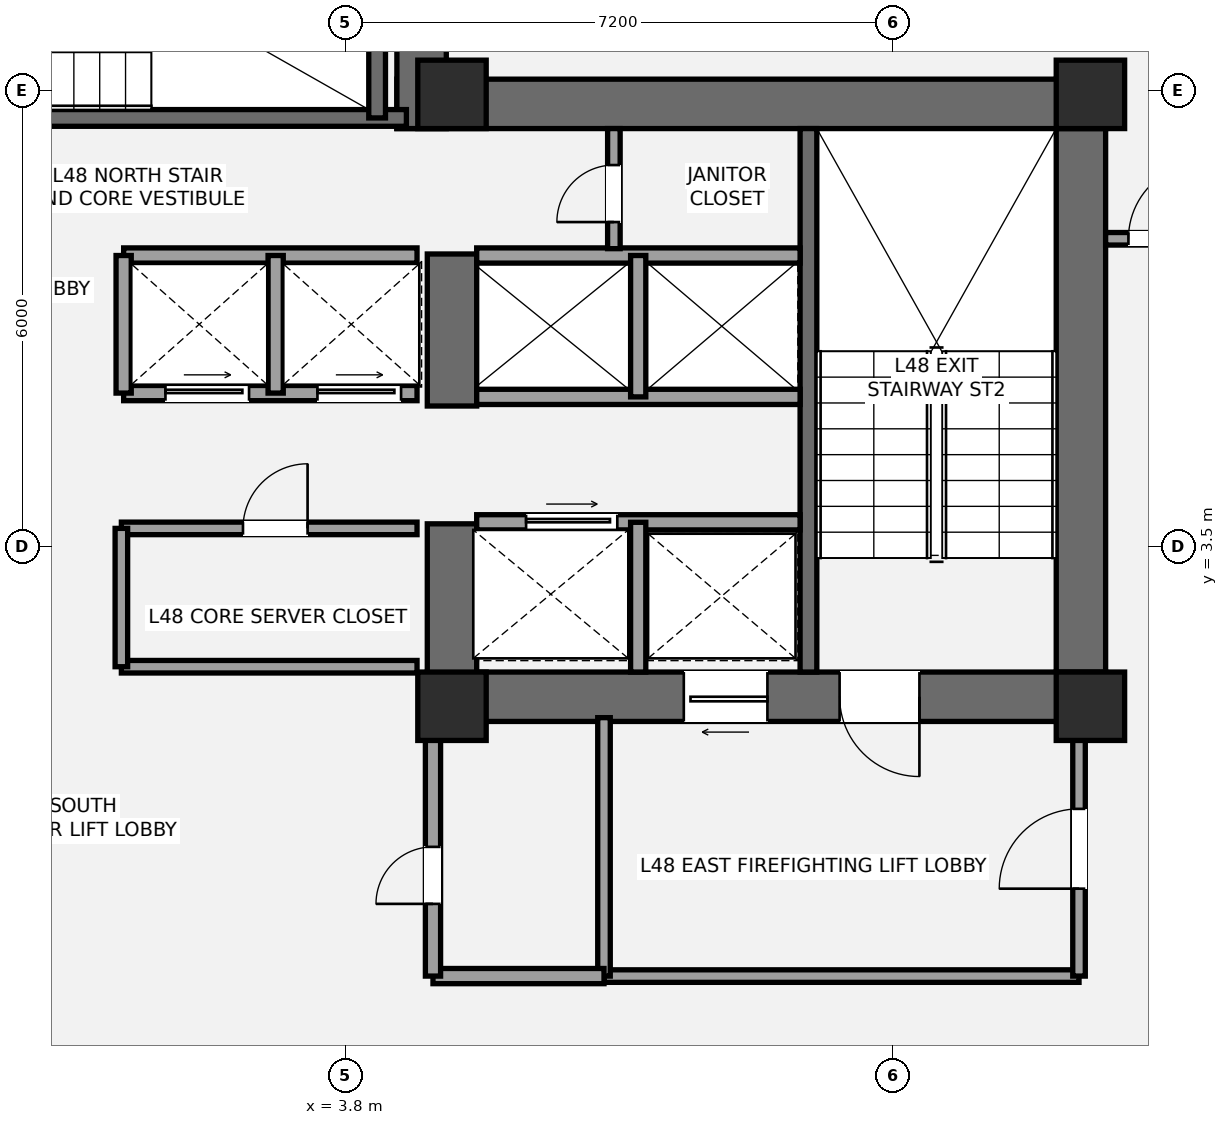
"""IFC4 building model, lengths in metres.
Left out: names, types, materials, properties, quantities, classifications, styles, units other than length and angle.
Written with IfcOpenShell. Run it as: python <this file> out.ifc"""

import sys

from ifc_helpers import new_model, si_unit, direction, frame, frame_2d, origin, origin_2d, place, context, subcontext, project, spatial, rectangle, extrude, element, fill, save


model = new_model("IFC4")
c1 = context("Model", 3, precision=1e-05, world=origin(), true_north=direction((0.0, 1.0)))
c2 = subcontext(c1, "Body", "Model", "MODEL_VIEW")
j1 = project(units=[si_unit("LENGTHUNIT", "METRE"), si_unit("PLANEANGLEUNIT", "RADIAN")], contexts=[c1])
p1 = place(None, origin())
s1 = spatial("IfcSite", under=j1, at=p1, CompositionType="ELEMENT")
p2 = place(p1, origin())
s2 = spatial("IfcBuilding", under=s1, at=p2, CompositionType="ELEMENT")
p3 = place(p2, frame((0.0, 0.0, 175.8)))
s3 = spatial("IfcBuildingStorey", under=s2, at=p3, CompositionType="ELEMENT", Elevation=175.8)
p4 = place(p3, frame((13.475, 1.2, 0.0), z_axis=(0.0, 0.0, 1.0), x_axis=(0.0, 1.0, 0.0)))
e1 = element("IfcWall", 1, at=p4, inside=s3, PredefinedType="SHEAR", context=c2, shape_type="SweptSolid", body=[
    extrude(rectangle(XDim=8.45, YDim=0.65, at=frame_2d((4.225, 0.0))), origin(), (0.0, 0.0, 1.0), 3.2),
])
p5 = place(p3, frame((4.475, 9.325, 0.0), z_axis=(0.0, 0.0, 1.0), x_axis=(1.0, 0.0, 0.0)))
e2 = element("IfcWall", 2, at=p5, inside=s3, PredefinedType="SHEAR", context=c2, shape_type="SweptSolid", body=[
    extrude(rectangle(XDim=9.325, YDim=0.65, at=frame_2d((4.663, 0.0))), origin(), (0.0, 0.0, 1.0), 3.2),
])
p6 = place(p3, frame((13.8, 1.525, 0.0), z_axis=(0.0, 0.0, 1.0), x_axis=(-1.0, 0.0, 0.0)))
e3 = element("IfcWall", 3, at=p6, inside=s3, PredefinedType="SHEAR", context=c2, shape_type="SweptSolid", body=[
    extrude(rectangle(XDim=8.925, YDim=0.65, at=frame_2d((4.462, 0.0))), origin(), (0.0, 0.0, 1.0), 3.2),
])
p7 = place(p6, frame((2.45, 0.0, 0.0)))
e4 = element("IfcOpeningElement", 4, at=p7, cuts=e3, PredefinedType="OPENING", context=c2, shape_type="SweptSolid", body=[
    extrude(rectangle(XDim=1.05, YDim=2.15, at=frame_2d((0.525, 1.075))), frame((0.0, 0.335, 0.0), z_axis=(0.0, -1.0, 0.0), x_axis=(1.0, 0.0, 0.0)), (0.0, 0.0, 1.0), 0.67),
])
p8 = place(p6, frame((4.45, 0.0, 0.0)))
e5 = element("IfcOpeningElement", 5, at=p8, cuts=e3, PredefinedType="OPENING", context=c2, shape_type="SweptSolid", body=[
    extrude(rectangle(XDim=1.1, YDim=2.2, at=frame_2d((0.55, 1.1))), frame((0.0, 0.335, 0.0), z_axis=(0.0, -1.0, 0.0), x_axis=(1.0, 0.0, 0.0)), (0.0, 0.0, 1.0), 0.67),
])
p9 = place(p3, frame((5.2, 1.2, 0.0), z_axis=(0.0, 0.0, 1.0), x_axis=(0.0, 1.0, 0.0)))
e6 = element("IfcWall", 6, at=p9, inside=s3, PredefinedType="SHEAR", context=c2, shape_type="SweptSolid", body=[
    extrude(rectangle(XDim=2.6, YDim=0.65, at=frame_2d((1.3, 0.0))), origin(), (0.0, 0.0, 1.0), 3.2),
])
p10 = place(p3, frame((5.2, 5.35, 0.0), z_axis=(0.0, 0.0, 1.0), x_axis=(0.0, 1.0, 0.0)))
e7 = element("IfcWall", 7, at=p10, inside=s3, PredefinedType="SHEAR", context=c2, shape_type="SweptSolid", body=[
    extrude(rectangle(XDim=2.0, YDim=0.65, at=frame_2d((1.0, 0.0))), origin(), (0.0, 0.0, 1.0), 3.2),
])
p11 = place(p3, frame((9.89, 1.85, 0.0), z_axis=(0.0, 0.0, 1.0), x_axis=(0.0, 1.0, 0.0)))
e8 = element("IfcWall", 8, at=p11, inside=s3, PredefinedType="SHEAR", context=c2, shape_type="SweptSolid", body=[
    extrude(rectangle(XDim=7.15, YDim=0.22, at=frame_2d((3.575, 0.0))), origin(), (0.0, 0.0, 1.0), 3.2),
])
p12 = place(p3, frame((4.8, 9.0, 0.0), z_axis=(0.0, 0.0, 1.0), x_axis=(0.0, 1.0, 0.0)))
e9 = element("IfcWall", 9, at=p12, inside=s3, PredefinedType="SHEAR", context=c2, shape_type="SweptSolid", body=[
    extrude(rectangle(XDim=4.05, YDim=0.65, at=frame_2d((2.025, 0.0))), origin(), (0.0, 0.0, 1.0), 3.2),
])
p13 = place(p3, frame((-4.7, 9.14, 0.0), z_axis=(0.0, 0.0, 1.0), x_axis=(1.0, 0.0, 0.0)))
e10 = element("IfcWall", 10, at=p13, inside=s3, PredefinedType="SHEAR", context=c2, shape_type="SweptSolid", body=[
    extrude(rectangle(XDim=9.3, YDim=0.22, at=frame_2d((4.65, 0.0))), origin(), (0.0, 0.0, 1.0), 3.2),
])
p14 = place(p13, frame((1.15, 0.0, 0.0)))
e11 = element("IfcOpeningElement", 11, at=p14, cuts=e10, PredefinedType="OPENING", context=c2, shape_type="SweptSolid", body=[
    extrude(rectangle(XDim=1.05, YDim=2.15, at=frame_2d((0.525, 1.075))), frame((0.0, 0.12, 0.0), z_axis=(0.0, -1.0, 0.0), x_axis=(1.0, 0.0, 0.0)), (0.0, 0.0, 1.0), 0.24),
])
p15 = place(p3, frame((4.215, 9.14, 0.0), z_axis=(0.0, 0.0, 1.0), x_axis=(0.0, 1.0, 0.0)))
e12 = element("IfcWall", 12, at=p15, inside=s3, PredefinedType="SHEAR", context=c2, shape_type="SweptSolid", body=[
    extrude(rectangle(XDim=3.26, YDim=0.22, at=frame_2d((1.63, 0.0))), origin(), (0.0, 0.0, 1.0), 3.2),
])
for number, where, z_axis, x_axis in (
    (13, (5.2, 1.4, 0.0), (0.0, 0.0, 1.0), (1.0, 0.0, 0.0)),
    (14, (5.2, 9.45, 0.0), (0.0, 0.0, 1.0), (1.0, 0.0, 0.0)),
    (15, (13.6, 1.4, 0.0), (0.0, 0.0, 1.0), (1.0, 0.0, 0.0)),
    (16, (13.6, 9.45, 0.0), (0.0, 0.0, 1.0), (1.0, 0.0, 0.0)),
):
    element("IfcColumn", number, at=place(p3, frame(where, z_axis=z_axis, x_axis=x_axis)), inside=s3, PredefinedType="COLUMN", context=c2, shape_type="SweptSolid", body=[
        extrude(rectangle(XDim=0.9, YDim=0.9, at=origin_2d()), origin(), (0.0, 0.0, 1.0), 3.2),
    ])
p16 = place(p3, frame((7.2, -2.15, 0.0), z_axis=(0.0, 0.0, 1.0), x_axis=(1.0, 0.0, 0.0)))
e17 = element("IfcWall", 17, at=p16, inside=s3, PredefinedType="PARTITIONING", context=c2, shape_type="SweptSolid", body=[
    extrude(rectangle(XDim=6.25, YDim=0.165, at=frame_2d((3.125, 0.0))), origin(), (0.0, 0.0, 1.0), 3.02),
])
p17 = place(p3, frame((7.2, -2.15, 0.0), z_axis=(0.0, 0.0, 1.0), x_axis=(0.0, 1.0, 0.0)))
e18 = element("IfcWall", 18, at=p17, inside=s3, PredefinedType="PARTITIONING", context=c2, shape_type="SweptSolid", body=[
    extrude(rectangle(XDim=3.4, YDim=0.165, at=frame_2d((1.7, 0.0))), origin(), (0.0, 0.0, 1.0), 2.473),
])
p18 = place(p3, frame((13.45, -2.15, 0.0), z_axis=(0.0, 0.0, 1.0), x_axis=(0.0, 1.0, 0.0)))
e19 = element("IfcWall", 19, at=p18, inside=s3, PredefinedType="PARTITIONING", context=c2, shape_type="SweptSolid", body=[
    extrude(rectangle(XDim=3.4, YDim=0.165, at=frame_2d((1.7, 0.0))), origin(), (0.0, 0.0, 1.0), 2.473),
])
p19 = place(p18, frame((1.15, 0.0, 0.0)))
e20 = element("IfcOpeningElement", 20, at=p19, cuts=e19, PredefinedType="OPENING", context=c2, shape_type="SweptSolid", body=[
    extrude(rectangle(XDim=1.05, YDim=2.15, at=frame_2d((0.525, 1.075))), frame((0.0, 0.093, 0.0), z_axis=(0.0, -1.0, 0.0), x_axis=(1.0, 0.0, 0.0)), (0.0, 0.0, 1.0), 0.185),
])
p20 = place(p3, frame((4.95, -2.15, 0.0), z_axis=(0.0, 0.0, 1.0), x_axis=(1.0, 0.0, 0.0)))
e21 = element("IfcWall", 21, at=p20, inside=s3, PredefinedType="SOLIDWALL", context=c2, shape_type="SweptSolid", body=[
    extrude(rectangle(XDim=2.25, YDim=0.2, at=frame_2d((1.125, 0.0))), origin(), (0.0, 0.0, 1.0), 3.02),
])
p21 = place(p3, frame((4.95, -2.15, 0.0), z_axis=(0.0, 0.0, 1.0), x_axis=(0.0, 1.0, 0.0)))
e22 = element("IfcWall", 22, at=p21, inside=s3, PredefinedType="SOLIDWALL", context=c2, shape_type="SweptSolid", body=[
    extrude(rectangle(XDim=3.4, YDim=0.2, at=frame_2d((1.7, 0.0))), origin(), (0.0, 0.0, 1.0), 2.473),
])
p22 = place(p21, frame((0.95, 0.0, 0.0)))
e23 = element("IfcOpeningElement", 23, at=p22, cuts=e22, PredefinedType="OPENING", context=c2, shape_type="SweptSolid", body=[
    extrude(rectangle(XDim=0.75, YDim=2.1, at=frame_2d((0.375, 1.05))), frame((0.0, 0.11, 0.0), z_axis=(0.0, -1.0, 0.0), x_axis=(1.0, 0.0, 0.0)), (0.0, 0.0, 1.0), 0.22),
])
p23 = place(p3, frame((5.525, 3.82, 0.0), z_axis=(0.0, 0.0, 1.0), x_axis=(1.0, 0.0, 0.0)))
e24 = element("IfcWall", 24, at=p23, inside=s3, PredefinedType="SOLIDWALL", context=c2, shape_type="SweptSolid", body=[
    extrude(rectangle(XDim=4.255, YDim=0.2, at=frame_2d((2.127, 0.0))), origin(), (0.0, 0.0, 1.0), 3.02),
])
p24 = place(p23, frame((0.65, 0.0, 0.0)))
e25 = element("IfcOpeningElement", 25, at=p24, cuts=e24, PredefinedType="OPENING", context=c2, shape_type="SweptSolid", body=[
    extrude(rectangle(XDim=1.2, YDim=2.2, at=frame_2d((0.6, 1.1))), frame((0.0, 0.11, 0.0), z_axis=(0.0, -1.0, 0.0), x_axis=(1.0, 0.0, 0.0)), (0.0, 0.0, 1.0), 0.22),
])
p25 = place(p3, frame((7.65, 1.85, 0.0), z_axis=(0.0, 0.0, 1.0), x_axis=(0.0, 1.0, 0.0)))
e26 = element("IfcWall", 26, at=p25, inside=s3, PredefinedType="SOLIDWALL", context=c2, shape_type="SweptSolid", body=[
    extrude(rectangle(XDim=1.97, YDim=0.2, at=frame_2d((0.985, 0.0))), origin(), (0.0, 0.0, 1.0), 3.02),
])
for number, where, z_axis, x_axis in (
    (27, (5.525, 5.47, 0.0), (0.0, 0.0, 1.0), (1.0, 0.0, 0.0)),
    (28, (5.525, 7.33, 0.0), (0.0, 0.0, 1.0), (1.0, 0.0, 0.0)),
):
    element("IfcWall", number, at=place(p3, frame(where, z_axis=z_axis, x_axis=x_axis)), inside=s3, PredefinedType="SOLIDWALL", context=c2, shape_type="SweptSolid", body=[
        extrude(rectangle(XDim=4.255, YDim=0.2, at=frame_2d((2.127, 0.0))), origin(), (0.0, 0.0, 1.0), 3.02),
    ])
p26 = place(p3, frame((7.65, 5.47, 0.0), z_axis=(0.0, 0.0, 1.0), x_axis=(0.0, 1.0, 0.0)))
e29 = element("IfcWall", 29, at=p26, inside=s3, PredefinedType="SOLIDWALL", context=c2, shape_type="SweptSolid", body=[
    extrude(rectangle(XDim=1.86, YDim=0.2, at=frame_2d((0.93, 0.0))), origin(), (0.0, 0.0, 1.0), 3.02),
])
p27 = place(p3, frame((0.85, 1.92, 0.0), z_axis=(0.0, 0.0, 1.0), x_axis=(1.0, 0.0, 0.0)))
e30 = element("IfcWall", 30, at=p27, inside=s3, PredefinedType="PARTITIONING", context=c2, shape_type="SweptSolid", body=[
    extrude(rectangle(XDim=3.89, YDim=0.165, at=frame_2d((1.945, 0.0))), origin(), (0.0, 0.0, 1.0), 2.16),
])
p28 = place(p3, frame((0.85, 3.74, 0.0), z_axis=(0.0, 0.0, 1.0), x_axis=(1.0, 0.0, 0.0)))
e31 = element("IfcWall", 31, at=p28, inside=s3, PredefinedType="PARTITIONING", context=c2, shape_type="SweptSolid", body=[
    extrude(rectangle(XDim=3.89, YDim=0.165, at=frame_2d((1.945, 0.0))), origin(), (0.0, 0.0, 1.0), 3.02),
])
p29 = place(p28, frame((1.6, 0.0, 0.0)))
e32 = element("IfcOpeningElement", 32, at=p29, cuts=e31, PredefinedType="OPENING", context=c2, shape_type="SweptSolid", body=[
    extrude(rectangle(XDim=0.85, YDim=2.1, at=frame_2d((0.425, 1.05))), frame((0.0, 0.093, 0.0), z_axis=(0.0, -1.0, 0.0), x_axis=(1.0, 0.0, 0.0)), (0.0, 0.0, 1.0), 0.185),
])
p30 = place(p3, frame((0.85, 1.92, 0.0), z_axis=(0.0, 0.0, 1.0), x_axis=(0.0, 1.0, 0.0)))
e33 = element("IfcWall", 33, at=p30, inside=s3, PredefinedType="PARTITIONING", context=c2, shape_type="SweptSolid", body=[
    extrude(rectangle(XDim=1.82, YDim=0.165, at=frame_2d((0.91, 0.0))), origin(), (0.0, 0.0, 1.0), 3.02),
])
p31 = place(p3, frame((0.88, 5.52, 0.0), z_axis=(0.0, 0.0, 1.0), x_axis=(1.0, 0.0, 0.0)))
e34 = element("IfcWall", 34, at=p31, inside=s3, PredefinedType="SOLIDWALL", context=c2, shape_type="SweptSolid", body=[
    extrude(rectangle(XDim=3.86, YDim=0.2, at=frame_2d((1.93, 0.0))), origin(), (0.0, 0.0, 1.0), 3.02),
])
p32 = place(p31, frame((0.55, 0.0, 0.0)))
e35 = element("IfcOpeningElement", 35, at=p32, cuts=e34, PredefinedType="OPENING", context=c2, shape_type="SweptSolid", body=[
    extrude(rectangle(XDim=1.1, YDim=2.2, at=frame_2d((0.55, 1.1))), frame((0.0, 0.11, 0.0), z_axis=(0.0, -1.0, 0.0), x_axis=(1.0, 0.0, 0.0)), (0.0, 0.0, 1.0), 0.22),
])
p33 = place(p31, frame((2.55, 0.0, 0.0)))
e36 = element("IfcOpeningElement", 36, at=p33, cuts=e34, PredefinedType="OPENING", context=c2, shape_type="SweptSolid", body=[
    extrude(rectangle(XDim=1.1, YDim=2.2, at=frame_2d((0.55, 1.1))), frame((0.0, 0.11, 0.0), z_axis=(0.0, -1.0, 0.0), x_axis=(1.0, 0.0, 0.0)), (0.0, 0.0, 1.0), 0.22),
])
p34 = place(p3, frame((0.88, 7.33, 0.0), z_axis=(0.0, 0.0, 1.0), x_axis=(1.0, 0.0, 0.0)))
e37 = element("IfcWall", 37, at=p34, inside=s3, PredefinedType="SOLIDWALL", context=c2, shape_type="SweptSolid", body=[
    extrude(rectangle(XDim=3.86, YDim=0.2, at=frame_2d((1.93, 0.0))), origin(), (0.0, 0.0, 1.0), 3.02),
])
for number, where, z_axis, x_axis in (
    (38, (2.88, 5.52, 0.0), (0.0, 0.0, 1.0), (0.0, 1.0, 0.0)),
    (39, (0.88, 5.52, 0.0), (0.0, 0.0, 1.0), (0.0, 1.0, 0.0)),
):
    element("IfcWall", number, at=place(p3, frame(where, z_axis=z_axis, x_axis=x_axis)), inside=s3, PredefinedType="SOLIDWALL", context=c2, shape_type="SweptSolid", body=[
        extrude(rectangle(XDim=1.81, YDim=0.2, at=frame_2d((0.905, 0.0))), origin(), (0.0, 0.0, 1.0), 3.02),
    ])
p35 = place(p3, frame((7.33, 7.42, 0.0), z_axis=(0.0, 0.0, 1.0), x_axis=(0.0, 1.0, 0.0)))
e40 = element("IfcWall", 40, at=p35, inside=s3, PredefinedType="PARTITIONING", context=c2, shape_type="SweptSolid", body=[
    extrude(rectangle(XDim=1.58, YDim=0.165, at=frame_2d((0.79, 0.0))), origin(), (0.0, 0.0, 1.0), 3.02),
])
p36 = place(p35, frame((0.35, 0.0, 0.0)))
e41 = element("IfcOpeningElement", 41, at=p36, cuts=e40, PredefinedType="OPENING", context=c2, shape_type="SweptSolid", body=[
    extrude(rectangle(XDim=0.75, YDim=2.1, at=frame_2d((0.375, 1.05))), frame((0.0, 0.093, 0.0), z_axis=(0.0, -1.0, 0.0), x_axis=(1.0, 0.0, 0.0)), (0.0, 0.0, 1.0), 0.185),
])
p37 = place(p3, frame((13.8, 7.55, 0.0), z_axis=(0.0, 0.0, 1.0), x_axis=(1.0, 0.0, 0.0)))
e42 = element("IfcWall", 42, at=p37, inside=s3, PredefinedType="PARTITIONING", context=c2, shape_type="SweptSolid", body=[
    extrude(rectangle(XDim=1.75, YDim=0.165, at=frame_2d((0.875, 0.0))), origin(), (0.0, 0.0, 1.0), 3.02),
])
p38 = place(p37, frame((0.3, 0.0, 0.0)))
e43 = element("IfcOpeningElement", 43, at=p38, cuts=e42, PredefinedType="OPENING", context=c2, shape_type="SweptSolid", body=[
    extrude(rectangle(XDim=1.0, YDim=2.15, at=frame_2d((0.5, 1.075))), frame((0.0, 0.093, 0.0), z_axis=(0.0, -1.0, 0.0), x_axis=(1.0, 0.0, 0.0)), (0.0, 0.0, 1.0), 0.185),
])
p39 = place(p7, origin())
e44 = element("IfcDoor", 44, at=p39, inside=s3, OperationType="SINGLE_SWING_LEFT", PredefinedType="DOOR", context=c2, shape_type="SweptSolid", body=[
    extrude(rectangle(XDim=1.05, YDim=2.15, at=frame_2d((0.525, 1.075))), frame((0.0, 0.025, 0.0), z_axis=(0.0, -1.0, 0.0), x_axis=(1.0, 0.0, 0.0)), (0.0, 0.0, 1.0), 0.05),
])
fill(e4, e44)
p40 = place(p19, origin())
e45 = element("IfcDoor", 45, at=p40, inside=s3, OperationType="SINGLE_SWING_LEFT", PredefinedType="DOOR", context=c2, shape_type="SweptSolid", body=[
    extrude(rectangle(XDim=1.05, YDim=2.15, at=frame_2d((0.525, 1.075))), frame((0.0, 0.025, 0.0), z_axis=(0.0, -1.0, 0.0), x_axis=(1.0, 0.0, 0.0)), (0.0, 0.0, 1.0), 0.05),
])
fill(e20, e45)
p41 = place(p22, origin())
e46 = element("IfcDoor", 46, at=p41, inside=s3, OperationType="SINGLE_SWING_LEFT", PredefinedType="DOOR", context=c2, shape_type="SweptSolid", body=[
    extrude(rectangle(XDim=0.75, YDim=2.1, at=frame_2d((0.375, 1.05))), frame((0.0, 0.025, 0.0), z_axis=(0.0, -1.0, 0.0), x_axis=(1.0, 0.0, 0.0)), (0.0, 0.0, 1.0), 0.05),
])
fill(e23, e46)
p42 = place(p8, origin())
e47 = element("IfcDoor", 47, at=p42, inside=s3, OperationType="SLIDING_TO_LEFT", PredefinedType="DOOR", context=c2, shape_type="SweptSolid", body=[
    extrude(rectangle(XDim=1.1, YDim=2.2, at=frame_2d((0.55, 1.1))), frame((0.0, 0.025, 0.0), z_axis=(0.0, -1.0, 0.0), x_axis=(1.0, 0.0, 0.0)), (0.0, 0.0, 1.0), 0.05),
])
fill(e5, e47)
p43 = place(p24, origin())
e48 = element("IfcDoor", 48, at=p43, inside=s3, OperationType="SLIDING_TO_RIGHT", PredefinedType="DOOR", context=c2, shape_type="SweptSolid", body=[
    extrude(rectangle(XDim=1.2, YDim=2.2, at=frame_2d((0.6, 1.1))), frame((0.0, 0.025, 0.0), z_axis=(0.0, -1.0, 0.0), x_axis=(1.0, 0.0, 0.0)), (0.0, 0.0, 1.0), 0.05),
])
fill(e25, e48)
p44 = place(p29, origin())
e49 = element("IfcDoor", 49, at=p44, inside=s3, OperationType="SINGLE_SWING_RIGHT", PredefinedType="DOOR", context=c2, shape_type="SweptSolid", body=[
    extrude(rectangle(XDim=0.85, YDim=2.1, at=frame_2d((0.425, 1.05))), frame((0.0, 0.025, 0.0), z_axis=(0.0, -1.0, 0.0), x_axis=(1.0, 0.0, 0.0)), (0.0, 0.0, 1.0), 0.05),
])
fill(e32, e49)
p45 = place(p32, origin())
e50 = element("IfcDoor", 50, at=p45, inside=s3, OperationType="SLIDING_TO_LEFT", PredefinedType="DOOR", context=c2, shape_type="SweptSolid", body=[
    extrude(rectangle(XDim=1.1, YDim=2.2, at=frame_2d((0.55, 1.1))), frame((0.0, 0.025, 0.0), z_axis=(0.0, -1.0, 0.0), x_axis=(1.0, 0.0, 0.0)), (0.0, 0.0, 1.0), 0.05),
])
fill(e35, e50)
p46 = place(p33, origin())
e51 = element("IfcDoor", 51, at=p46, inside=s3, OperationType="SLIDING_TO_LEFT", PredefinedType="DOOR", context=c2, shape_type="SweptSolid", body=[
    extrude(rectangle(XDim=1.1, YDim=2.2, at=frame_2d((0.55, 1.1))), frame((0.0, 0.025, 0.0), z_axis=(0.0, -1.0, 0.0), x_axis=(1.0, 0.0, 0.0)), (0.0, 0.0, 1.0), 0.05),
])
fill(e36, e51)
p47 = place(p36, origin())
e52 = element("IfcDoor", 52, at=p47, inside=s3, OperationType="SINGLE_SWING_LEFT", PredefinedType="DOOR", context=c2, shape_type="SweptSolid", body=[
    extrude(rectangle(XDim=0.75, YDim=2.1, at=frame_2d((0.375, 1.05))), frame((0.0, 0.025, 0.0), z_axis=(0.0, -1.0, 0.0), x_axis=(1.0, 0.0, 0.0)), (0.0, 0.0, 1.0), 0.05),
])
fill(e41, e52)
p48 = place(p38, origin())
e53 = element("IfcDoor", 53, at=p48, inside=s3, OperationType="SINGLE_SWING_RIGHT", PredefinedType="DOOR", context=c2, shape_type="SweptSolid", body=[
    extrude(rectangle(XDim=1.0, YDim=2.15, at=frame_2d((0.5, 1.075))), frame((0.0, 0.025, 0.0), z_axis=(0.0, -1.0, 0.0), x_axis=(1.0, 0.0, 0.0)), (0.0, 0.0, 1.0), 0.05),
])
fill(e43, e53)
save(model, sys.argv[1])
